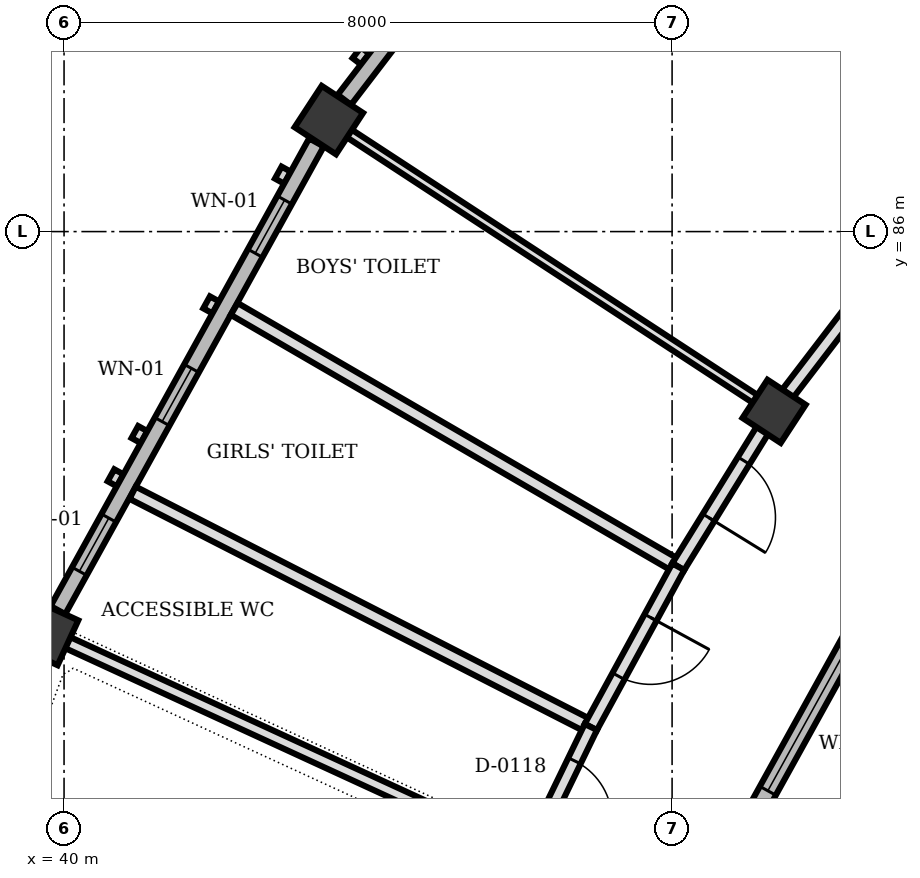
"""IFC4 building model, lengths in metres.
Left out: names, types, materials, properties, quantities, classifications, styles, units other than length and angle.
Written with IfcOpenShell. Run it as: python <this file> out.ifc"""

import sys

from ifc_helpers import new_model, si_unit, direction, frame, frame_2d, origin, origin_2d, place, context, subcontext, project, spatial, rectangle, extrude, element, fill, save


model = new_model("IFC4")
c1 = context("Model", 3, precision=1e-05, world=origin(), true_north=direction((0.0, 1.0)))
c2 = subcontext(c1, "Body", "Model", "MODEL_VIEW")
j1 = project(units=[si_unit("LENGTHUNIT", "METRE"), si_unit("PLANEANGLEUNIT", "RADIAN")], contexts=[c1])
p1 = place(None, origin())
s1 = spatial("IfcSite", under=j1, at=p1, CompositionType="ELEMENT")
p2 = place(p1, origin())
s2 = spatial("IfcBuilding", under=s1, at=p2, CompositionType="ELEMENT")
p3 = place(p2, origin())
s3 = spatial("IfcBuildingStorey", under=s2, at=p3, CompositionType="ELEMENT", Elevation=0.0)
p4 = place(p3, frame((49.342, 83.635, 0.0), z_axis=(0.0, 0.0, 1.0), x_axis=(-0.836840759551, 0.547446383817, 0.0)))
e1 = element("IfcColumn", 1, at=p4, inside=s3, PredefinedType="COLUMN", context=c2, shape_type="SweptSolid", body=[
    extrude(rectangle(XDim=0.6, YDim=0.6, at=origin_2d()), origin(), (0.0, 0.0, 1.0), 4.5),
])
for number, where, z_axis, x_axis in (
    (2, (43.484, 87.467, 0.0), (0.0, 0.0, 1.0), (-0.837, 0.547, 0.0)),
    (3, (39.756, 80.726, 0.0), (0.0, 0.0, 1.0), (-0.909, 0.418, 0.0)),
):
    element("IfcColumn", number, at=place(p3, frame(where, z_axis=z_axis, x_axis=x_axis)), inside=s3, PredefinedType="COLUMN", context=c2, shape_type="SweptSolid", body=[
        extrude(rectangle(XDim=0.65, YDim=0.65, at=origin_2d()), origin(), (0.0, 0.0, 1.0), 4.5),
    ])
p5 = place(p3, frame((43.688, 87.734, 0.0), z_axis=(0.0, 0.0, 1.0), x_axis=(0.60805685998, 0.793893478391, 0.0)))
e4 = element("IfcWall", 4, at=p5, inside=s3, PredefinedType="SOLIDWALL", context=c2, shape_type="SweptSolid", body=[
    extrude(rectangle(XDim=7.032, YDim=0.22, at=frame_2d((3.516, 0.0))), origin(), (0.0, 0.0, 1.0), 3.55),
])
p6 = place(p5, frame((0.956, 0.0, 0.85)))
e5 = element("IfcOpeningElement", 5, at=p6, cuts=e4, PredefinedType="OPENING", context=c2, shape_type="SweptSolid", body=[
    extrude(rectangle(XDim=0.9, YDim=1.4, at=frame_2d((0.45, 0.7))), frame((0.0, 0.12, 0.0), z_axis=(0.0, -1.0, 0.0), x_axis=(1.0, 0.0, 0.0)), (0.0, 0.0, 1.0), 0.24),
])
p7 = place(p5, frame((2.363, 0.0, 0.85)))
e6 = element("IfcOpeningElement", 6, at=p7, cuts=e4, PredefinedType="OPENING", context=c2, shape_type="SweptSolid", body=[
    extrude(rectangle(XDim=0.9, YDim=1.4, at=frame_2d((0.45, 0.7))), frame((0.0, 0.12, 0.0), z_axis=(0.0, -1.0, 0.0), x_axis=(1.0, 0.0, 0.0)), (0.0, 0.0, 1.0), 0.24),
])
p8 = place(p5, frame((3.769, 0.0, 0.85)))
e7 = element("IfcOpeningElement", 7, at=p8, cuts=e4, PredefinedType="OPENING", context=c2, shape_type="SweptSolid", body=[
    extrude(rectangle(XDim=0.9, YDim=1.4, at=frame_2d((0.45, 0.7))), frame((0.0, 0.12, 0.0), z_axis=(0.0, -1.0, 0.0), x_axis=(1.0, 0.0, 0.0)), (0.0, 0.0, 1.0), 0.24),
])
p9 = place(p5, frame((5.176, 0.0, 0.85)))
e8 = element("IfcOpeningElement", 8, at=p9, cuts=e4, PredefinedType="OPENING", context=c2, shape_type="SweptSolid", body=[
    extrude(rectangle(XDim=0.9, YDim=1.4, at=frame_2d((0.45, 0.7))), frame((0.0, 0.12, 0.0), z_axis=(0.0, -1.0, 0.0), x_axis=(1.0, 0.0, 0.0)), (0.0, 0.0, 1.0), 0.24),
])
p10 = place(p3, frame((39.919, 81.02, 0.0), z_axis=(0.0, 0.0, 1.0), x_axis=(0.483873000068, 0.87513822897, 0.0)))
e9 = element("IfcWall", 9, at=p10, inside=s3, PredefinedType="SOLIDWALL", context=c2, shape_type="SweptSolid", body=[
    extrude(rectangle(XDim=7.031, YDim=0.22, at=frame_2d((3.516, 0.0))), origin(), (0.0, 0.0, 1.0), 3.55),
])
p11 = place(p10, frame((0.584, 0.0, 1.15)))
e10 = element("IfcOpeningElement", 10, at=p11, cuts=e9, PredefinedType="OPENING", context=c2, shape_type="SweptSolid", body=[
    extrude(rectangle(XDim=0.8, YDim=1.1, at=frame_2d((0.4, 0.55))), frame((0.0, 0.12, 0.0), z_axis=(0.0, -1.0, 0.0), x_axis=(1.0, 0.0, 0.0)), (0.0, 0.0, 1.0), 0.24),
])
p12 = place(p10, frame((2.834, 0.0, 1.15)))
e11 = element("IfcOpeningElement", 11, at=p12, cuts=e9, PredefinedType="OPENING", context=c2, shape_type="SweptSolid", body=[
    extrude(rectangle(XDim=0.8, YDim=1.1, at=frame_2d((0.4, 0.55))), frame((0.0, 0.12, 0.0), z_axis=(0.0, -1.0, 0.0), x_axis=(1.0, 0.0, 0.0)), (0.0, 0.0, 1.0), 0.24),
])
p13 = place(p10, frame((5.365, 0.0, 1.15)))
e12 = element("IfcOpeningElement", 12, at=p13, cuts=e9, PredefinedType="OPENING", context=c2, shape_type="SweptSolid", body=[
    extrude(rectangle(XDim=0.8, YDim=1.1, at=frame_2d((0.4, 0.55))), frame((0.0, 0.12, 0.0), z_axis=(0.0, -1.0, 0.0), x_axis=(1.0, 0.0, 0.0)), (0.0, 0.0, 1.0), 0.24),
])
p14 = place(p3, frame((51.151, 82.063, 0.0), z_axis=(0.0, 0.0, 1.0), x_axis=(-0.483955379171, -0.875092675647, 0.0)))
e13 = element("IfcWall", 13, at=p14, inside=s3, PredefinedType="SOLIDWALL", context=c2, shape_type="SweptSolid", body=[
    extrude(rectangle(XDim=5.666, YDim=0.24, at=frame_2d((2.833, 0.0))), origin(), (0.0, 0.0, 1.0), 3.55),
])
p15 = place(p14, frame((1.758, 0.0, 0.9)))
e14 = element("IfcOpeningElement", 14, at=p15, cuts=e13, PredefinedType="OPENING", context=c2, shape_type="SweptSolid", body=[
    extrude(rectangle(XDim=2.15, YDim=1.25, at=frame_2d((1.075, 0.625))), frame((0.0, 0.13, 0.0), z_axis=(0.0, -1.0, 0.0), x_axis=(1.0, 0.0, 0.0)), (0.0, 0.0, 1.0), 0.26),
])
p16 = place(p3, frame((49.098, 83.795, 0.0), z_axis=(0.0, 0.0, 1.0), x_axis=(-0.836919139192, 0.547326551935, 0.0)))
e15 = element("IfcWall", 15, at=p16, inside=s3, PredefinedType="PARTITIONING", context=c2, shape_type="SweptSolid", body=[
    extrude(rectangle(XDim=6.391, YDim=0.12, at=frame_2d((3.196, 0.0))), origin(), (0.0, 0.0, 1.0), 3.572),
])
p17 = place(p3, frame((45.851, 77.923, 0.0), z_axis=(0.0, 0.0, 1.0), x_axis=(-0.908513073448, 0.41785642914, 0.0)))
e16 = element("IfcWall", 16, at=p17, inside=s3, PredefinedType="PARTITIONING", context=c2, shape_type="SweptSolid", body=[
    extrude(rectangle(XDim=6.392, YDim=0.16, at=frame_2d((3.196, 0.0))), origin(), (0.0, 0.0, 1.0), 3.572),
])
p18 = place(p3, frame((48.081, 81.591, 0.0), z_axis=(0.0, 0.0, 1.0), x_axis=(-0.864871459639, 0.501993384719, 0.0)))
e17 = element("IfcWall", 17, at=p18, inside=s3, PredefinedType="PARTITIONING", context=c2, shape_type="SweptSolid", body=[
    extrude(rectangle(XDim=6.755, YDim=0.18, at=frame_2d((3.377, 0.0))), origin(), (0.0, 0.0, 1.0), 3.572),
])
p19 = place(p3, frame((46.931, 79.482, 0.0), z_axis=(0.0, 0.0, 1.0), x_axis=(-0.890396362977, 0.455186024387, 0.0)))
e18 = element("IfcWall", 18, at=p19, inside=s3, PredefinedType="PARTITIONING", context=c2, shape_type="SweptSolid", body=[
    extrude(rectangle(XDim=6.771, YDim=0.18, at=frame_2d((3.385, 0.0))), origin(), (0.0, 0.0, 1.0), 3.572),
])
p20 = place(p3, frame((53.217, 88.696, 0.0), z_axis=(0.0, 0.0, 1.0), x_axis=(-0.607883612756, -0.794026141473, 0.0)))
e19 = element("IfcWall", 19, at=p20, inside=s3, PredefinedType="PARTITIONING", context=c2, shape_type="SweptSolid", body=[
    extrude(rectangle(XDim=6.082, YDim=0.18, at=frame_2d((3.041, 0.0))), origin(), (0.0, 0.0, 1.0), 3.572),
])
p21 = place(p20, frame((2.416, 0.0, 0.0)))
e20 = element("IfcOpeningElement", 20, at=p21, cuts=e19, PredefinedType="OPENING", context=c2, shape_type="SweptSolid", body=[
    extrude(rectangle(XDim=1.25, YDim=2.2, at=frame_2d((0.625, 1.1))), frame((0.0, 0.1, 0.0), z_axis=(0.0, -1.0, 0.0), x_axis=(1.0, 0.0, 0.0)), (0.0, 0.0, 1.0), 0.2),
])
p22 = place(p3, frame((49.189, 83.386, 0.0), z_axis=(0.0, 0.0, 1.0), x_axis=(-0.525246440568, -0.850950161097, 0.0)))
e21 = element("IfcWall", 21, at=p22, inside=s3, PredefinedType="PARTITIONING", context=c2, shape_type="SweptSolid", body=[
    extrude(rectangle(XDim=2.109, YDim=0.18, at=frame_2d((1.055, 0.0))), origin(), (0.0, 0.0, 1.0), 3.572),
])
p23 = place(p22, frame((0.469, 0.0, 0.0)))
e22 = element("IfcOpeningElement", 22, at=p23, cuts=e21, PredefinedType="OPENING", context=c2, shape_type="SweptSolid", body=[
    extrude(rectangle(XDim=0.88, YDim=2.1, at=frame_2d((0.44, 1.05))), frame((0.0, 0.1, 0.0), z_axis=(0.0, -1.0, 0.0), x_axis=(1.0, 0.0, 0.0)), (0.0, 0.0, 1.0), 0.2),
])
p24 = place(p3, frame((48.081, 81.591, 0.0), z_axis=(0.0, 0.0, 1.0), x_axis=(-0.478759564311, -0.87794605733, 0.0)))
e23 = element("IfcWall", 23, at=p24, inside=s3, PredefinedType="PARTITIONING", context=c2, shape_type="SweptSolid", body=[
    extrude(rectangle(XDim=2.402, YDim=0.18, at=frame_2d((1.201, 0.0))), origin(), (0.0, 0.0, 1.0), 3.572),
])
p25 = place(p24, frame((0.761, 0.0, 0.0)))
e24 = element("IfcOpeningElement", 24, at=p25, cuts=e23, PredefinedType="OPENING", context=c2, shape_type="SweptSolid", body=[
    extrude(rectangle(XDim=0.88, YDim=2.1, at=frame_2d((0.44, 1.05))), frame((0.0, 0.1, 0.0), z_axis=(0.0, -1.0, 0.0), x_axis=(1.0, 0.0, 0.0)), (0.0, 0.0, 1.0), 0.2),
])
p26 = place(p3, frame((46.931, 79.482, 0.0), z_axis=(0.0, 0.0, 1.0), x_axis=(-0.436524333187, -0.899692451083, 0.0)))
e25 = element("IfcWall", 25, at=p26, inside=s3, PredefinedType="PARTITIONING", context=c2, shape_type="SweptSolid", body=[
    extrude(rectangle(XDim=1.576, YDim=0.18, at=frame_2d((0.788, 0.0))), origin(), (0.0, 0.0, 1.0), 3.572),
])
p27 = place(p26, frame((0.494, 0.0, 0.0)))
e26 = element("IfcOpeningElement", 26, at=p27, cuts=e25, PredefinedType="OPENING", context=c2, shape_type="SweptSolid", body=[
    extrude(rectangle(XDim=0.88, YDim=2.1, at=frame_2d((0.44, 1.05))), frame((0.0, 0.1, 0.0), z_axis=(0.0, -1.0, 0.0), x_axis=(1.0, 0.0, 0.0)), (0.0, 0.0, 1.0), 0.2),
])
p28 = place(p11, origin())
e27 = element("IfcWindow", 27, at=p28, inside=s3, PartitioningType="SINGLE_PANEL", PredefinedType="WINDOW", context=c2, shape_type="SweptSolid", body=[
    extrude(rectangle(XDim=0.8, YDim=1.1, at=frame_2d((0.4, 0.55))), frame((0.0, 0.03, 0.0), z_axis=(0.0, -1.0, 0.0), x_axis=(1.0, 0.0, 0.0)), (0.0, 0.0, 1.0), 0.06),
])
fill(e10, e27)
p29 = place(p12, origin())
e28 = element("IfcWindow", 28, at=p29, inside=s3, PartitioningType="SINGLE_PANEL", PredefinedType="WINDOW", context=c2, shape_type="SweptSolid", body=[
    extrude(rectangle(XDim=0.8, YDim=1.1, at=frame_2d((0.4, 0.55))), frame((0.0, 0.03, 0.0), z_axis=(0.0, -1.0, 0.0), x_axis=(1.0, 0.0, 0.0)), (0.0, 0.0, 1.0), 0.06),
])
fill(e11, e28)
p30 = place(p13, origin())
e29 = element("IfcWindow", 29, at=p30, inside=s3, PartitioningType="SINGLE_PANEL", PredefinedType="WINDOW", context=c2, shape_type="SweptSolid", body=[
    extrude(rectangle(XDim=0.8, YDim=1.1, at=frame_2d((0.4, 0.55))), frame((0.0, 0.03, 0.0), z_axis=(0.0, -1.0, 0.0), x_axis=(1.0, 0.0, 0.0)), (0.0, 0.0, 1.0), 0.06),
])
fill(e12, e29)
p31 = place(p15, origin())
e30 = element("IfcWindow", 30, at=p31, inside=s3, PartitioningType="SINGLE_PANEL", PredefinedType="WINDOW", context=c2, shape_type="SweptSolid", body=[
    extrude(rectangle(XDim=2.15, YDim=1.25, at=frame_2d((1.075, 0.625))), frame((0.0, 0.03, 0.0), z_axis=(0.0, -1.0, 0.0), x_axis=(1.0, 0.0, 0.0)), (0.0, 0.0, 1.0), 0.06),
])
fill(e14, e30)
p32 = place(p23, origin())
e31 = element("IfcDoor", 31, at=p32, inside=s3, OperationType="SINGLE_SWING_RIGHT", PredefinedType="DOOR", context=c2, shape_type="SweptSolid", body=[
    extrude(rectangle(XDim=0.88, YDim=2.1, at=frame_2d((0.44, 1.05))), frame((0.0, 0.025, 0.0), z_axis=(0.0, -1.0, 0.0), x_axis=(1.0, 0.0, 0.0)), (0.0, 0.0, 1.0), 0.05),
])
fill(e22, e31)
p33 = place(p25, origin())
e32 = element("IfcDoor", 32, at=p33, inside=s3, OperationType="SINGLE_SWING_LEFT", PredefinedType="DOOR", context=c2, shape_type="SweptSolid", body=[
    extrude(rectangle(XDim=0.88, YDim=2.1, at=frame_2d((0.44, 1.05))), frame((0.0, 0.025, 0.0), z_axis=(0.0, -1.0, 0.0), x_axis=(1.0, 0.0, 0.0)), (0.0, 0.0, 1.0), 0.05),
])
fill(e24, e32)
p34 = place(p27, origin())
e33 = element("IfcDoor", 33, at=p34, inside=s3, OperationType="SINGLE_SWING_RIGHT", PredefinedType="DOOR", context=c2, shape_type="SweptSolid", body=[
    extrude(rectangle(XDim=0.88, YDim=2.1, at=frame_2d((0.44, 1.05))), frame((0.0, 0.025, 0.0), z_axis=(0.0, -1.0, 0.0), x_axis=(1.0, 0.0, 0.0)), (0.0, 0.0, 1.0), 0.05),
])
fill(e26, e33)
save(model, sys.argv[1])
